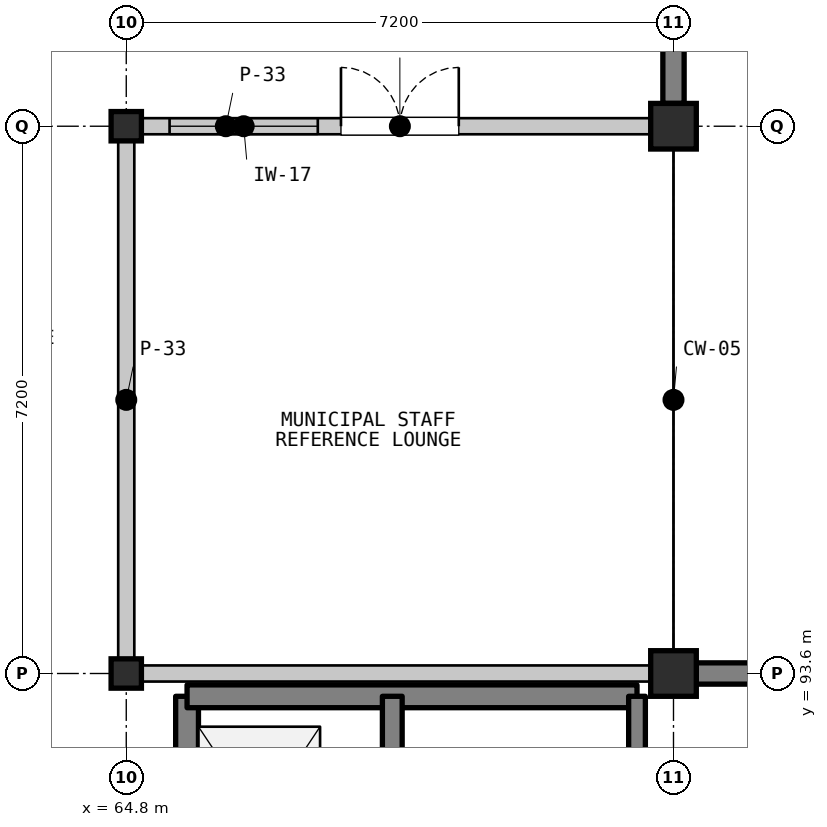
"""IFC4 building model, lengths in metres.
Left out: names, types, materials, properties, quantities, classifications, styles, units other than length and angle.
Written with IfcOpenShell. Run it as: python <this file> out.ifc"""

import sys

from ifc_helpers import new_model, si_unit, direction, frame, frame_2d, origin, origin_2d, place, context, subcontext, project, spatial, rectangle, i_section, extrude, element, fill, save


model = new_model("IFC4")
c1 = context("Model", 3, precision=1e-05, world=origin(), true_north=direction((0.0, 1.0)))
c2 = subcontext(c1, "Body", "Model", "MODEL_VIEW")
j1 = project(units=[si_unit("LENGTHUNIT", "METRE"), si_unit("PLANEANGLEUNIT", "RADIAN")], contexts=[c1])
p1 = place(None, origin())
s1 = spatial("IfcSite", under=j1, at=p1, CompositionType="ELEMENT")
p2 = place(p1, origin())
s2 = spatial("IfcBuilding", under=s1, at=p2, CompositionType="ELEMENT")
p3 = place(p2, frame((0.0, 0.0, 9.9)))
s3 = spatial("IfcBuildingStorey", under=s2, at=p3, CompositionType="ELEMENT", Elevation=9.9)
for number, where, z_axis, x_axis in (
    (1, (64.8, 93.6, 0.0), (0.0, 0.0, 1.0), (1.0, 0.0, 0.0)),
    (2, (64.8, 100.8, 0.0), (0.0, 0.0, 1.0), (1.0, 0.0, 0.0)),
):
    element("IfcColumn", number, at=place(p3, frame(where, z_axis=z_axis, x_axis=x_axis)), inside=s3, PredefinedType="COLUMN", context=c2, shape_type="SweptSolid", body=[
        extrude(i_section(OverallWidth=0.399, OverallDepth=0.386, WebThickness=0.021, FlangeThickness=0.033, FilletRadius=0.015, at=origin_2d()), origin(), (0.0, 0.0, 1.0), 4.2),
    ])
for number, where, z_axis, x_axis in (
    (3, (72.0, 93.6, 0.0), (0.0, 0.0, 1.0), (1.0, 0.0, 0.0)),
    (4, (72.0, 100.8, 0.0), (0.0, 0.0, 1.0), (1.0, 0.0, 0.0)),
):
    element("IfcColumn", number, at=place(p3, frame(where, z_axis=z_axis, x_axis=x_axis)), inside=s3, PredefinedType="COLUMN", context=c2, shape_type="SweptSolid", body=[
        extrude(rectangle(XDim=0.6, YDim=0.6, at=origin_2d()), origin(), (0.0, 0.0, 1.0), 4.2),
    ])
p4 = place(p3, frame((72.0, 107.7, 0.0), z_axis=(0.0, 0.0, 1.0), x_axis=(0.0, -1.0, 0.0)))
e5 = element("IfcWall", 5, at=p4, inside=s3, PredefinedType="SOLIDWALL", context=c2, shape_type="SweptSolid", body=[
    extrude(rectangle(XDim=6.6, YDim=0.28, at=frame_2d((3.3, 0.0))), origin(), (0.0, 0.0, 1.0), 3.487),
])
p5 = place(p4, frame((0.859, 0.0, 0.95)))
e6 = element("IfcOpeningElement", 6, at=p5, cuts=e5, PredefinedType="OPENING", context=c2, shape_type="SweptSolid", body=[
    extrude(rectangle(XDim=1.45, YDim=1.85, at=frame_2d((0.725, 0.925))), frame((0.0, 0.15, 0.0), z_axis=(0.0, -1.0, 0.0), x_axis=(1.0, 0.0, 0.0)), (0.0, 0.0, 1.0), 0.3),
])
p6 = place(p4, frame((4.291, 0.0, 0.95)))
e7 = element("IfcOpeningElement", 7, at=p6, cuts=e5, PredefinedType="OPENING", context=c2, shape_type="SweptSolid", body=[
    extrude(rectangle(XDim=1.45, YDim=1.85, at=frame_2d((0.725, 0.925))), frame((0.0, 0.15, 0.0), z_axis=(0.0, -1.0, 0.0), x_axis=(1.0, 0.0, 0.0)), (0.0, 0.0, 1.0), 0.3),
])
p7 = place(p3, frame((72.3, 93.6, 0.0), z_axis=(0.0, 0.0, 1.0), x_axis=(1.0, 0.0, 0.0)))
e8 = element("IfcWall", 8, at=p7, inside=s3, PredefinedType="SOLIDWALL", context=c2, shape_type="SweptSolid", body=[
    extrude(rectangle(XDim=6.6, YDim=0.28, at=frame_2d((3.3, 0.0))), origin(), (0.0, 0.0, 1.0), 3.418),
])
p8 = place(p3, frame((65.6, 88.98, 0.0), z_axis=(0.0, 0.0, 1.0), x_axis=(0.0, 1.0, 0.0)))
e9 = element("IfcWall", 9, at=p8, inside=s3, PredefinedType="SHEAR", context=c2, shape_type="SweptSolid", body=[
    extrude(rectangle(XDim=4.32, YDim=0.3, at=frame_2d((2.16, 0.0))), origin(), (0.0, 0.0, 1.0), 4.02),
])
p9 = place(p3, frame((65.6, 93.3, 0.0), z_axis=(0.0, 0.0, 1.0), x_axis=(1.0, 0.0, 0.0)))
e10 = element("IfcWall", 10, at=p9, inside=s3, PredefinedType="SHEAR", context=c2, shape_type="SweptSolid", body=[
    extrude(rectangle(XDim=5.92, YDim=0.3, at=frame_2d((2.96, 0.0))), origin(), (0.0, 0.0, 1.0), 4.02),
])
p10 = place(p3, frame((68.3, 93.3, 0.0), z_axis=(0.0, 0.0, 1.0), x_axis=(0.0, -1.0, 0.0)))
e11 = element("IfcWall", 11, at=p10, inside=s3, PredefinedType="SHEAR", context=c2, shape_type="SweptSolid", body=[
    extrude(rectangle(XDim=4.32, YDim=0.26, at=frame_2d((2.16, 0.0))), origin(), (0.0, 0.0, 1.0), 4.02),
])
p11 = place(p10, frame((1.0, 0.0, 0.0)))
e12 = element("IfcOpeningElement", 12, at=p11, cuts=e11, PredefinedType="OPENING", context=c2, shape_type="SweptSolid", body=[
    extrude(rectangle(XDim=1.2, YDim=2.15, at=frame_2d((0.6, 1.075))), frame((0.0, 0.14, 0.0), z_axis=(0.0, -1.0, 0.0), x_axis=(1.0, 0.0, 0.0)), (0.0, 0.0, 1.0), 0.28),
])
p12 = place(p10, frame((3.325, 0.0, 0.0)))
e13 = element("IfcOpeningElement", 13, at=p12, cuts=e11, PredefinedType="OPENING", context=c2, shape_type="SweptSolid", body=[
    extrude(rectangle(XDim=0.85, YDim=2.05, at=frame_2d((0.425, 1.025))), frame((0.0, 0.14, 0.0), z_axis=(0.0, -1.0, 0.0), x_axis=(1.0, 0.0, 0.0)), (0.0, 0.0, 1.0), 0.28),
])
p13 = place(p3, frame((71.52, 93.3, 0.0), z_axis=(0.0, 0.0, 1.0), x_axis=(0.0, -1.0, 0.0)))
e14 = element("IfcWall", 14, at=p13, inside=s3, PredefinedType="SHEAR", context=c2, shape_type="SweptSolid", body=[
    extrude(rectangle(XDim=4.45, YDim=0.22, at=frame_2d((2.225, 0.0))), origin(), (0.0, 0.0, 1.0), 4.02),
])
p14 = place(p13, frame((1.55, 0.0, 0.0)))
e15 = element("IfcOpeningElement", 15, at=p14, cuts=e14, PredefinedType="OPENING", context=c2, shape_type="SweptSolid", body=[
    extrude(rectangle(XDim=1.6, YDim=2.2, at=frame_2d((0.8, 1.1))), frame((0.0, 0.12, 0.0), z_axis=(0.0, -1.0, 0.0), x_axis=(1.0, 0.0, 0.0)), (0.0, 0.0, 1.0), 0.24),
])
p15 = place(p3, frame((64.92, 100.8, 0.0), z_axis=(0.0, 0.0, 1.0), x_axis=(1.0, 0.0, 0.0)))
e16 = element("IfcWall", 16, at=p15, inside=s3, PredefinedType="PARTITIONING", context=c2, shape_type="SweptSolid", body=[
    extrude(rectangle(XDim=6.96, YDim=0.212, at=frame_2d((3.48, 0.0))), origin(), (0.0, 0.0, 1.0), 3.408),
])
p16 = place(p15, frame((2.705, 0.0, 0.0)))
e17 = element("IfcOpeningElement", 17, at=p16, cuts=e16, PredefinedType="OPENING", context=c2, shape_type="SweptSolid", body=[
    extrude(rectangle(XDim=1.55, YDim=2.3, at=frame_2d((0.775, 1.15))), frame((0.0, 0.116, 0.0), z_axis=(0.0, -1.0, 0.0), x_axis=(1.0, 0.0, 0.0)), (0.0, 0.0, 1.0), 0.232),
])
p17 = place(p15, frame((0.45, 0.0, 1.05)))
e18 = element("IfcOpeningElement", 18, at=p17, cuts=e16, PredefinedType="OPENING", context=c2, shape_type="SweptSolid", body=[
    extrude(rectangle(XDim=1.95, YDim=1.22, at=frame_2d((0.975, 0.61))), frame((0.0, 0.116, 0.0), z_axis=(0.0, -1.0, 0.0), x_axis=(1.0, 0.0, 0.0)), (0.0, 0.0, 1.0), 0.232),
])
for number, where, z_axis, x_axis in (
    (19, (71.88, 93.6, 0.0), (0.0, 0.0, 1.0), (-1.0, 0.0, 0.0)),
    (20, (64.8, 93.72, 0.0), (0.0, 0.0, 1.0), (0.0, 1.0, 0.0)),
):
    element("IfcWall", number, at=place(p3, frame(where, z_axis=z_axis, x_axis=x_axis)), inside=s3, PredefinedType="PARTITIONING", context=c2, shape_type="SweptSolid", body=[
        extrude(rectangle(XDim=6.96, YDim=0.212, at=frame_2d((3.48, 0.0))), origin(), (0.0, 0.0, 1.0), 3.408),
    ])
p18 = place(p16, origin())
e21 = element("IfcDoor", 21, at=p18, inside=s3, OperationType="DOUBLE_DOOR_SINGLE_SWING", PredefinedType="DOOR", context=c2, shape_type="SweptSolid", body=[
    extrude(rectangle(XDim=1.55, YDim=2.3, at=frame_2d((0.775, 1.15))), frame((0.0, 0.025, 0.0), z_axis=(0.0, -1.0, 0.0), x_axis=(1.0, 0.0, 0.0)), (0.0, 0.0, 1.0), 0.05),
])
fill(e17, e21)
p19 = place(p17, origin())
e22 = element("IfcWindow", 22, at=p19, inside=s3, PartitioningType="SINGLE_PANEL", PredefinedType="WINDOW", context=c2, shape_type="SweptSolid", body=[
    extrude(rectangle(XDim=1.95, YDim=1.22, at=frame_2d((0.975, 0.61))), frame((0.0, 0.03, 0.0), z_axis=(0.0, -1.0, 0.0), x_axis=(1.0, 0.0, 0.0)), (0.0, 0.0, 1.0), 0.06),
])
fill(e18, e22)
save(model, sys.argv[1])
